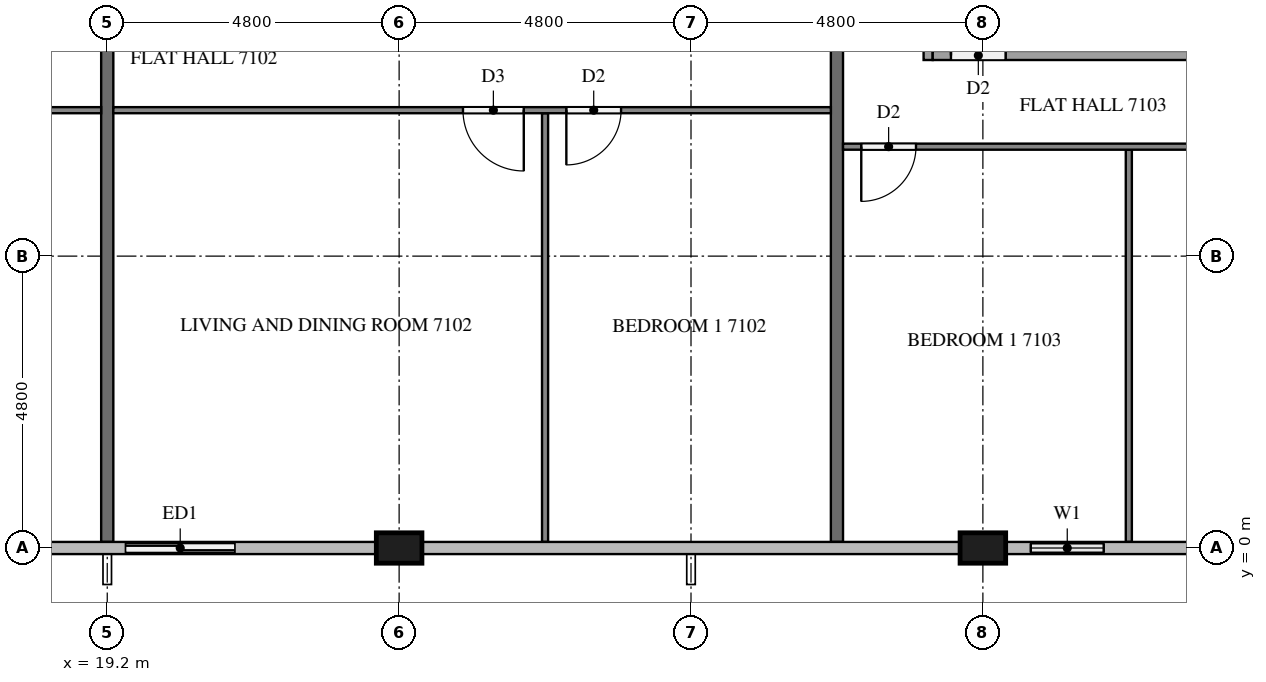
"""IFC4 building model, lengths in metres.
Left out: names, types, materials, properties, quantities, classifications, styles, units other than length and angle.
Written with IfcOpenShell. Run it as: python <this file> out.ifc"""

import sys

from ifc_helpers import new_model, si_unit, direction, frame, frame_2d, origin, origin_2d, place, context, subcontext, project, spatial, rectangle, extrude, element, fill, save


model = new_model("IFC4")
c1 = context("Model", 3, precision=1e-05, world=origin(), true_north=direction((0.0, 1.0)))
c2 = subcontext(c1, "Body", "Model", "MODEL_VIEW")
j1 = project(units=[si_unit("LENGTHUNIT", "METRE"), si_unit("PLANEANGLEUNIT", "RADIAN")], contexts=[c1])
p1 = place(None, origin())
s1 = spatial("IfcSite", under=j1, at=p1, CompositionType="ELEMENT")
p2 = place(p1, origin())
s2 = spatial("IfcBuilding", under=s1, at=p2, CompositionType="ELEMENT")
p3 = place(p2, frame((0.0, 0.0, 272.1)))
s3 = spatial("IfcBuildingStorey", under=s2, at=p3, CompositionType="ELEMENT", Elevation=272.1)
for number, where, z_axis, x_axis in (
    (1, (24.0, 0.0, 0.0), (0.0, 0.0, 1.0), (1.0, 0.0, 0.0)),
    (2, (33.6, 0.0, 0.0), (0.0, 0.0, 1.0), (1.0, 0.0, 0.0)),
):
    element("IfcColumn", number, at=place(p3, frame(where, z_axis=z_axis, x_axis=x_axis)), inside=s3, PredefinedType="COLUMN", context=c2, shape_type="SweptSolid", body=[
        extrude(rectangle(XDim=0.75, YDim=0.5, at=origin_2d()), origin(), (0.0, 0.0, 1.0), 3.2),
    ])
p4 = place(p3, frame((19.2, 0.0, 0.0), z_axis=(0.0, 0.0, 1.0), x_axis=(1.0, 0.0, 0.0)))
e3 = element("IfcWall", 3, at=p4, inside=s3, PredefinedType="SOLIDWALL", context=c2, shape_type="SweptSolid", body=[
    extrude(rectangle(XDim=2.4, YDim=0.15, at=frame_2d((1.2, 0.0))), origin(), (0.0, 0.0, 1.0), 3.2),
])
p5 = place(p4, frame((0.3, 0.0, 0.0)))
e4 = element("IfcOpeningElement", 4, at=p5, cuts=e3, PredefinedType="OPENING", context=c2, shape_type="SweptSolid", body=[
    extrude(rectangle(XDim=1.8, YDim=2.4, at=frame_2d((0.9, 1.2))), frame((0.0, 0.085, 0.0), z_axis=(0.0, -1.0, 0.0), x_axis=(1.0, 0.0, 0.0)), (0.0, 0.0, 1.0), 0.17),
])
p6 = place(p3, frame((33.975, 0.0, 0.0), z_axis=(0.0, 0.0, 1.0), x_axis=(1.0, 0.0, 0.0)))
e5 = element("IfcWall", 5, at=p6, inside=s3, PredefinedType="SOLIDWALL", context=c2, shape_type="SweptSolid", body=[
    extrude(rectangle(XDim=2.025, YDim=0.15, at=frame_2d((1.012, 0.0))), origin(), (0.0, 0.0, 1.0), 3.2),
])
p7 = place(p6, frame((0.413, 0.0, 0.9)))
e6 = element("IfcOpeningElement", 6, at=p7, cuts=e5, PredefinedType="OPENING", context=c2, shape_type="SweptSolid", body=[
    extrude(rectangle(XDim=1.2, YDim=1.4, at=frame_2d((0.6, 0.7))), frame((0.0, 0.085, 0.0), z_axis=(0.0, -1.0, 0.0), x_axis=(1.0, 0.0, 0.0)), (0.0, 0.0, 1.0), 0.17),
])
for number, where, z_axis, x_axis in (
    (7, (19.2, 11.9, 0.0), (0.0, 0.0, 1.0), (0.0, -1.0, 0.0)),
    (8, (31.2, 11.9, 0.0), (0.0, 0.0, 1.0), (0.0, -1.0, 0.0)),
):
    element("IfcWall", number, at=place(p3, frame(where, z_axis=z_axis, x_axis=x_axis)), inside=s3, PredefinedType="PARTITIONING", context=c2, shape_type="SweptSolid", body=[
        extrude(rectangle(XDim=11.8, YDim=0.2, at=frame_2d((5.9, 0.0))), origin(), (0.0, 0.0, 1.0), 3.2),
    ])
p8 = place(p3, frame((19.1, 7.2, 0.0), z_axis=(0.0, 0.0, 1.0), x_axis=(-1.0, 0.0, 0.0)))
e9 = element("IfcWall", 9, at=p8, inside=s3, PredefinedType="PARTITIONING", context=c2, shape_type="SweptSolid", body=[
    extrude(rectangle(XDim=19.0, YDim=0.1, at=frame_2d((9.5, 0.0))), origin(), (0.0, 0.0, 1.0), 3.2),
])
p9 = place(p8, frame((3.45, 0.0, 0.0)))
e10 = element("IfcOpeningElement", 10, at=p9, cuts=e9, PredefinedType="OPENING", context=c2, shape_type="SweptSolid", body=[
    extrude(rectangle(XDim=0.9, YDim=2.1, at=frame_2d((0.45, 1.05))), frame((0.0, 0.06, 0.0), z_axis=(0.0, -1.0, 0.0), x_axis=(1.0, 0.0, 0.0)), (0.0, 0.0, 1.0), 0.12),
])
p10 = place(p8, frame((5.05, 0.0, 0.0)))
e11 = element("IfcOpeningElement", 11, at=p10, cuts=e9, PredefinedType="OPENING", context=c2, shape_type="SweptSolid", body=[
    extrude(rectangle(XDim=0.9, YDim=2.1, at=frame_2d((0.45, 1.05))), frame((0.0, 0.06, 0.0), z_axis=(0.0, -1.0, 0.0), x_axis=(1.0, 0.0, 0.0)), (0.0, 0.0, 1.0), 0.12),
])
p11 = place(p8, frame((13.05, 0.0, 0.0)))
e12 = element("IfcOpeningElement", 12, at=p11, cuts=e9, PredefinedType="OPENING", context=c2, shape_type="SweptSolid", body=[
    extrude(rectangle(XDim=0.9, YDim=2.1, at=frame_2d((0.45, 1.05))), frame((0.0, 0.06, 0.0), z_axis=(0.0, -1.0, 0.0), x_axis=(1.0, 0.0, 0.0)), (0.0, 0.0, 1.0), 0.12),
])
p12 = place(p8, frame((14.65, 0.0, 0.0)))
e13 = element("IfcOpeningElement", 13, at=p12, cuts=e9, PredefinedType="OPENING", context=c2, shape_type="SweptSolid", body=[
    extrude(rectangle(XDim=1.0, YDim=2.1, at=frame_2d((0.5, 1.05))), frame((0.0, 0.06, 0.0), z_axis=(0.0, -1.0, 0.0), x_axis=(1.0, 0.0, 0.0)), (0.0, 0.0, 1.0), 0.12),
])
p13 = place(p3, frame((26.4, 7.15, 0.0), z_axis=(0.0, 0.0, 1.0), x_axis=(0.0, -1.0, 0.0)))
e14 = element("IfcWall", 14, at=p13, inside=s3, PredefinedType="PARTITIONING", context=c2, shape_type="SweptSolid", body=[
    extrude(rectangle(XDim=7.05, YDim=0.1, at=frame_2d((3.525, 0.0))), origin(), (0.0, 0.0, 1.0), 3.2),
])
p14 = place(p3, frame((31.1, 7.2, 0.0), z_axis=(0.0, 0.0, 1.0), x_axis=(-1.0, 0.0, 0.0)))
e15 = element("IfcWall", 15, at=p14, inside=s3, PredefinedType="PARTITIONING", context=c2, shape_type="SweptSolid", body=[
    extrude(rectangle(XDim=11.8, YDim=0.1, at=frame_2d((5.9, 0.0))), origin(), (0.0, 0.0, 1.0), 3.2),
])
p15 = place(p14, frame((3.45, 0.0, 0.0)))
e16 = element("IfcOpeningElement", 16, at=p15, cuts=e15, PredefinedType="OPENING", context=c2, shape_type="SweptSolid", body=[
    extrude(rectangle(XDim=0.9, YDim=2.1, at=frame_2d((0.45, 1.05))), frame((0.0, 0.06, 0.0), z_axis=(0.0, -1.0, 0.0), x_axis=(1.0, 0.0, 0.0)), (0.0, 0.0, 1.0), 0.12),
])
p16 = place(p14, frame((5.05, 0.0, 0.0)))
e17 = element("IfcOpeningElement", 17, at=p16, cuts=e15, PredefinedType="OPENING", context=c2, shape_type="SweptSolid", body=[
    extrude(rectangle(XDim=1.0, YDim=2.1, at=frame_2d((0.5, 1.05))), frame((0.0, 0.06, 0.0), z_axis=(0.0, -1.0, 0.0), x_axis=(1.0, 0.0, 0.0)), (0.0, 0.0, 1.0), 0.12),
])
p17 = place(p3, frame((36.0, 6.55, 0.0), z_axis=(0.0, 0.0, 1.0), x_axis=(0.0, -1.0, 0.0)))
e18 = element("IfcWall", 18, at=p17, inside=s3, PredefinedType="PARTITIONING", context=c2, shape_type="SweptSolid", body=[
    extrude(rectangle(XDim=6.45, YDim=0.1, at=frame_2d((3.225, 0.0))), origin(), (0.0, 0.0, 1.0), 3.2),
])
p18 = place(p3, frame((47.9, 6.6, 0.0), z_axis=(0.0, 0.0, 1.0), x_axis=(-1.0, 0.0, 0.0)))
e19 = element("IfcWall", 19, at=p18, inside=s3, PredefinedType="PARTITIONING", context=c2, shape_type="SweptSolid", body=[
    extrude(rectangle(XDim=16.6, YDim=0.1, at=frame_2d((8.3, 0.0))), origin(), (0.0, 0.0, 1.0), 3.2),
])
p19 = place(p18, frame((15.4, 0.0, 0.0)))
e20 = element("IfcOpeningElement", 20, at=p19, cuts=e19, PredefinedType="OPENING", context=c2, shape_type="SweptSolid", body=[
    extrude(rectangle(XDim=0.9, YDim=2.1, at=frame_2d((0.45, 1.05))), frame((0.0, 0.06, 0.0), z_axis=(0.0, -1.0, 0.0), x_axis=(1.0, 0.0, 0.0)), (0.0, 0.0, 1.0), 0.12),
])
p20 = place(p18, frame((7.45, 0.0, 0.0)))
e21 = element("IfcOpeningElement", 21, at=p20, cuts=e19, PredefinedType="OPENING", context=c2, shape_type="SweptSolid", body=[
    extrude(rectangle(XDim=0.9, YDim=2.1, at=frame_2d((0.45, 1.05))), frame((0.0, 0.06, 0.0), z_axis=(0.0, -1.0, 0.0), x_axis=(1.0, 0.0, 0.0)), (0.0, 0.0, 1.0), 0.12),
])
p21 = place(p18, frame((5.75, 0.0, 0.0)))
e22 = element("IfcOpeningElement", 22, at=p21, cuts=e19, PredefinedType="OPENING", context=c2, shape_type="SweptSolid", body=[
    extrude(rectangle(XDim=1.0, YDim=2.1, at=frame_2d((0.5, 1.05))), frame((0.0, 0.06, 0.0), z_axis=(0.0, -1.0, 0.0), x_axis=(1.0, 0.0, 0.0)), (0.0, 0.0, 1.0), 0.12),
])
p22 = place(p3, frame((32.7, 11.9, 0.0), z_axis=(0.0, 0.0, 1.0), x_axis=(0.0, -1.0, 0.0)))
e23 = element("IfcWall", 23, at=p22, inside=s3, PredefinedType="PARTITIONING", context=c2, shape_type="SweptSolid", body=[
    extrude(rectangle(XDim=3.875, YDim=0.15, at=frame_2d((1.938, 0.0))), origin(), (0.0, 0.0, 1.0), 3.2),
])
p23 = place(p3, frame((32.775, 8.1, 0.0), z_axis=(0.0, 0.0, 1.0), x_axis=(1.0, 0.0, 0.0)))
e24 = element("IfcWall", 24, at=p23, inside=s3, PredefinedType="PARTITIONING", context=c2, shape_type="SweptSolid", body=[
    extrude(rectangle(XDim=15.125, YDim=0.15, at=frame_2d((7.562, 0.0))), origin(), (0.0, 0.0, 1.0), 3.2),
])
p24 = place(p23, frame((0.3, 0.0, 0.0)))
e25 = element("IfcOpeningElement", 25, at=p24, cuts=e24, PredefinedType="OPENING", context=c2, shape_type="SweptSolid", body=[
    extrude(rectangle(XDim=0.9, YDim=2.1, at=frame_2d((0.45, 1.05))), frame((0.0, 0.085, 0.0), z_axis=(0.0, -1.0, 0.0), x_axis=(1.0, 0.0, 0.0)), (0.0, 0.0, 1.0), 0.17),
])
p25 = place(p23, frame((10.41, 0.0, 0.0)))
e26 = element("IfcOpeningElement", 26, at=p25, cuts=e24, PredefinedType="OPENING", context=c2, shape_type="SweptSolid", body=[
    extrude(rectangle(XDim=0.9, YDim=2.1, at=frame_2d((0.45, 1.05))), frame((0.0, 0.085, 0.0), z_axis=(0.0, -1.0, 0.0), x_axis=(1.0, 0.0, 0.0)), (0.0, 0.0, 1.0), 0.17),
])
p26 = place(p23, frame((11.96, 0.0, 0.0)))
e27 = element("IfcOpeningElement", 27, at=p26, cuts=e24, PredefinedType="OPENING", context=c2, shape_type="SweptSolid", body=[
    extrude(rectangle(XDim=0.8, YDim=2.1, at=frame_2d((0.4, 1.05))), frame((0.0, 0.085, 0.0), z_axis=(0.0, -1.0, 0.0), x_axis=(1.0, 0.0, 0.0)), (0.0, 0.0, 1.0), 0.17),
])
p27 = place(p5, origin())
e28 = element("IfcDoor", 28, at=p27, inside=s3, OperationType="SLIDING_TO_LEFT", PredefinedType="DOOR", context=c2, shape_type="SweptSolid", body=[
    extrude(rectangle(XDim=1.8, YDim=2.4, at=frame_2d((0.9, 1.2))), frame((0.0, 0.025, 0.0), z_axis=(0.0, -1.0, 0.0), x_axis=(1.0, 0.0, 0.0)), (0.0, 0.0, 1.0), 0.05),
])
fill(e4, e28)
p28 = place(p7, origin())
e29 = element("IfcWindow", 29, at=p28, inside=s3, PartitioningType="SINGLE_PANEL", PredefinedType="WINDOW", context=c2, shape_type="SweptSolid", body=[
    extrude(rectangle(XDim=1.2, YDim=1.4, at=frame_2d((0.6, 0.7))), frame((0.0, 0.03, 0.0), z_axis=(0.0, -1.0, 0.0), x_axis=(1.0, 0.0, 0.0)), (0.0, 0.0, 1.0), 0.06),
])
fill(e6, e29)
p29 = place(p15, origin())
e30 = element("IfcDoor", 30, at=p29, inside=s3, OperationType="SINGLE_SWING_RIGHT", PredefinedType="DOOR", context=c2, shape_type="SweptSolid", body=[
    extrude(rectangle(XDim=0.9, YDim=2.1, at=frame_2d((0.45, 1.05))), frame((0.0, 0.025, 0.0), z_axis=(0.0, -1.0, 0.0), x_axis=(1.0, 0.0, 0.0)), (0.0, 0.0, 1.0), 0.05),
])
fill(e16, e30)
p30 = place(p16, origin())
e31 = element("IfcDoor", 31, at=p30, inside=s3, OperationType="SINGLE_SWING_LEFT", PredefinedType="DOOR", context=c2, shape_type="SweptSolid", body=[
    extrude(rectangle(XDim=1.0, YDim=2.1, at=frame_2d((0.5, 1.05))), frame((0.0, 0.025, 0.0), z_axis=(0.0, -1.0, 0.0), x_axis=(1.0, 0.0, 0.0)), (0.0, 0.0, 1.0), 0.05),
])
fill(e17, e31)
p31 = place(p19, origin())
e32 = element("IfcDoor", 32, at=p31, inside=s3, OperationType="SINGLE_SWING_RIGHT", PredefinedType="DOOR", context=c2, shape_type="SweptSolid", body=[
    extrude(rectangle(XDim=0.9, YDim=2.1, at=frame_2d((0.45, 1.05))), frame((0.0, 0.025, 0.0), z_axis=(0.0, -1.0, 0.0), x_axis=(1.0, 0.0, 0.0)), (0.0, 0.0, 1.0), 0.05),
])
fill(e20, e32)
p32 = place(p24, origin())
e33 = element("IfcDoor", 33, at=p32, inside=s3, OperationType="SINGLE_SWING_LEFT", PredefinedType="DOOR", context=c2, shape_type="SweptSolid", body=[
    extrude(rectangle(XDim=0.9, YDim=2.1, at=frame_2d((0.45, 1.05))), frame((0.0, 0.025, 0.0), z_axis=(0.0, -1.0, 0.0), x_axis=(1.0, 0.0, 0.0)), (0.0, 0.0, 1.0), 0.05),
])
fill(e25, e33)
save(model, sys.argv[1])
